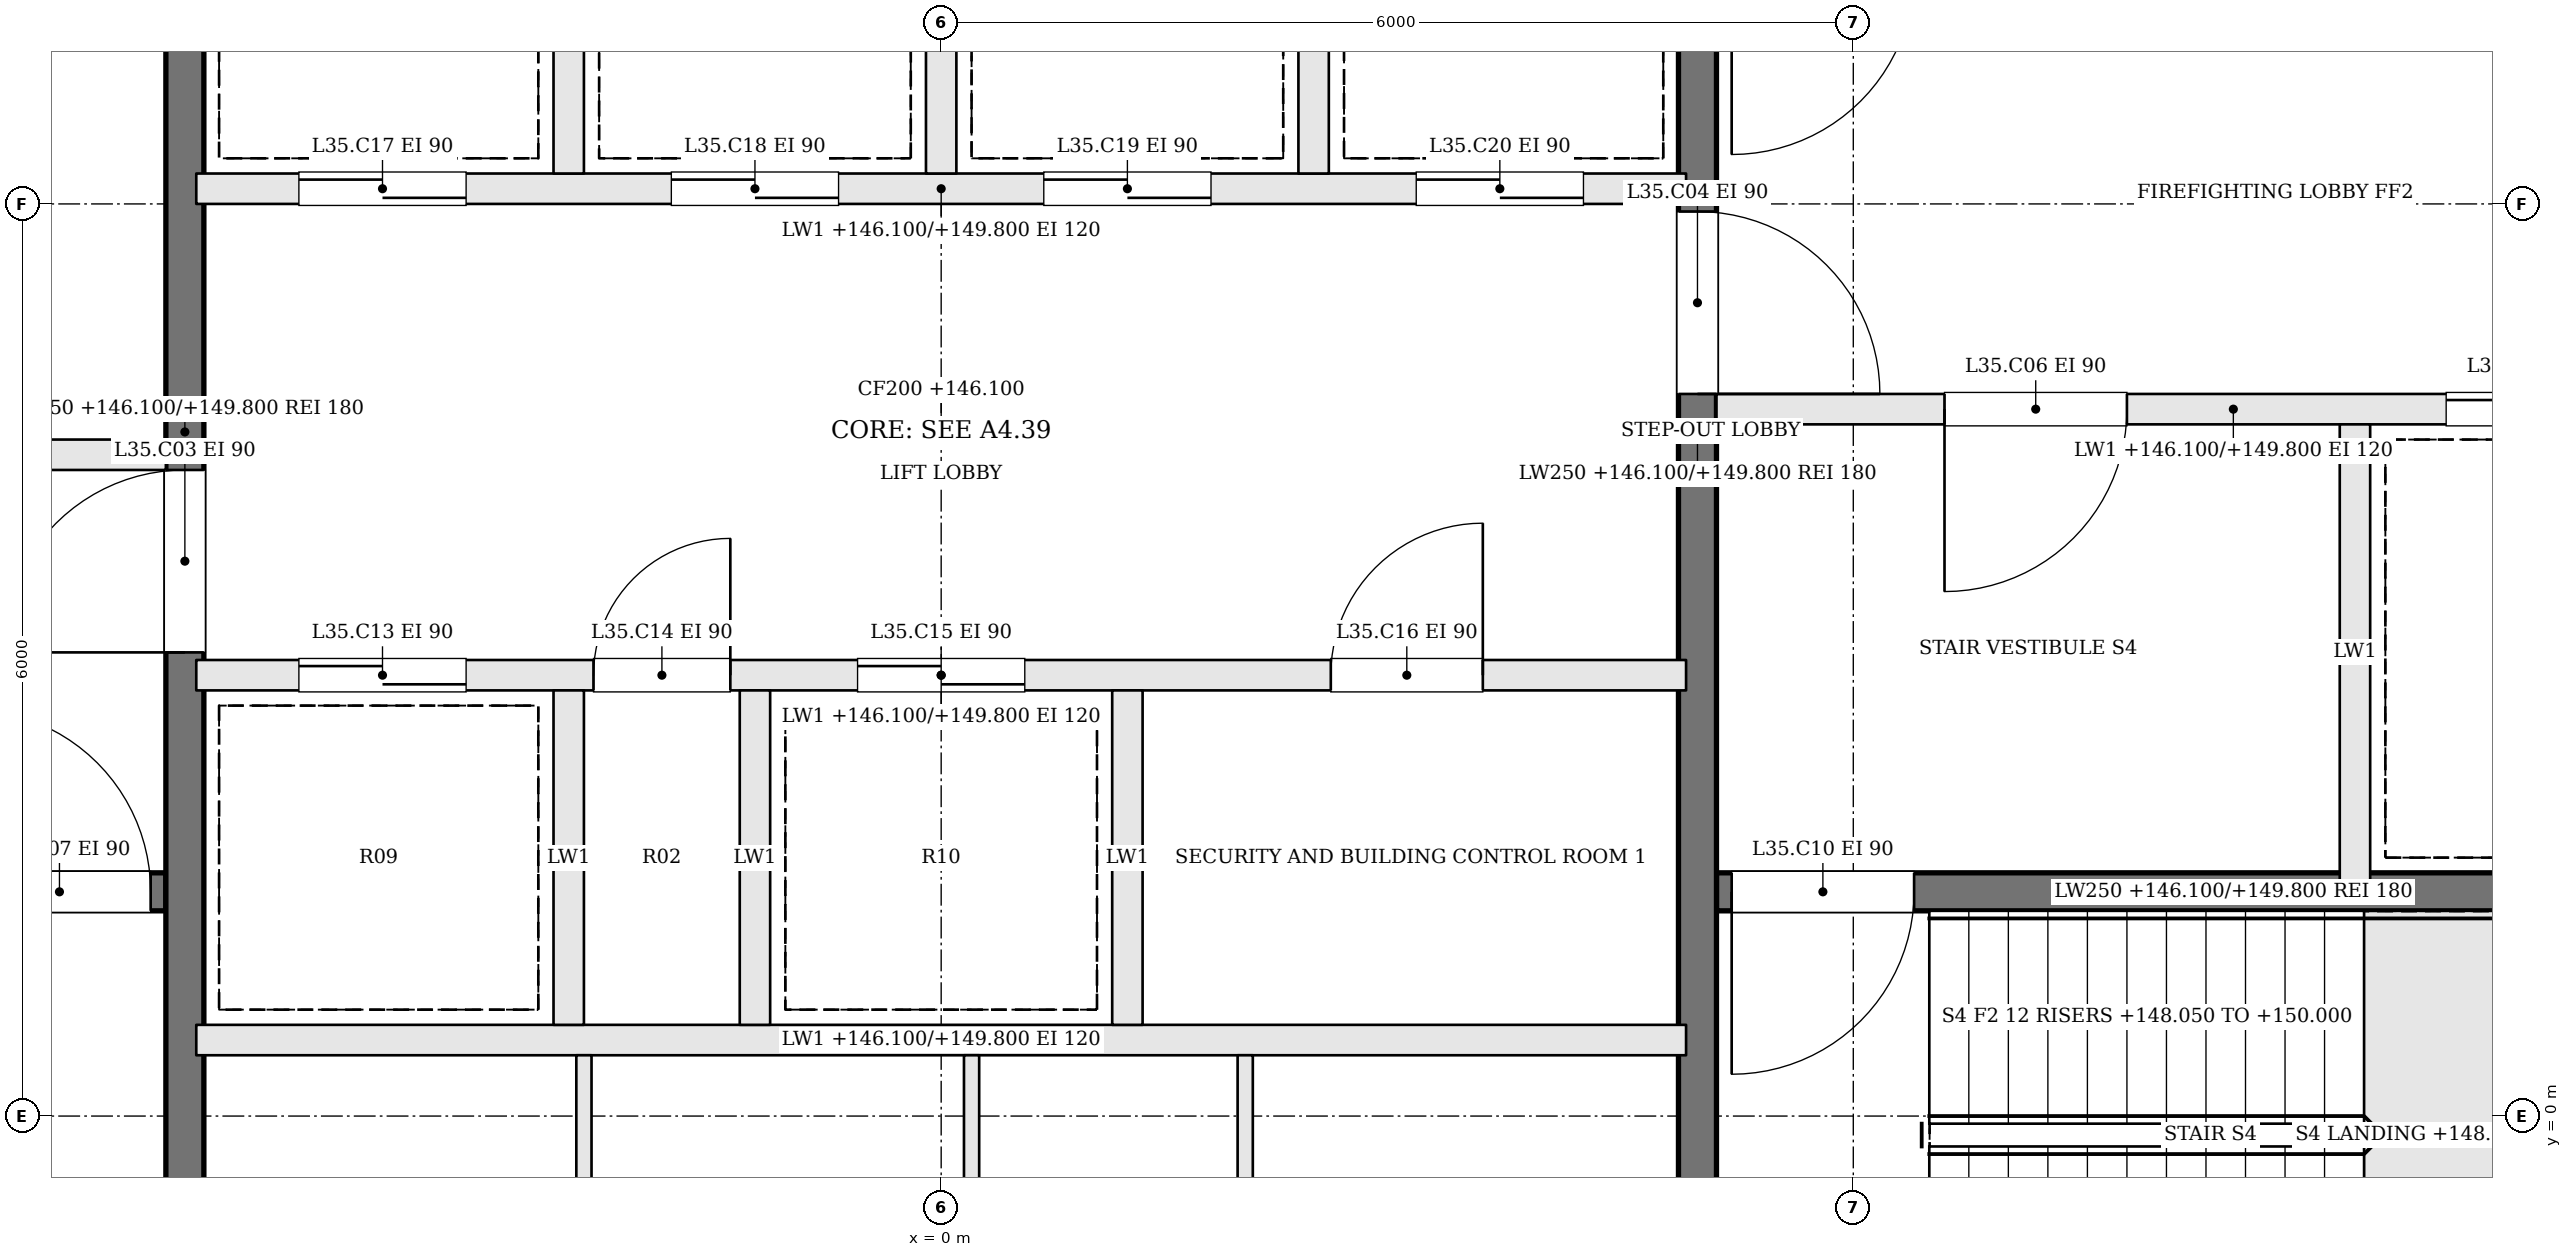
"""IFC4 building model, lengths in metres.
Left out: names, types, materials, properties, quantities, classifications, styles, units other than length and angle.
Written with IfcOpenShell. Run it as: python <this file> out.ifc"""

import sys

from ifc_helpers import new_model, si_unit, direction, frame, frame_2d, origin, place, context, subcontext, project, spatial, rectangle, extrude, element, fill, save


model = new_model("IFC4")
c1 = context("Model", 3, precision=1e-05, world=origin(), true_north=direction((0.0, 1.0)))
c2 = subcontext(c1, "Body", "Model", "MODEL_VIEW")
j1 = project(units=[si_unit("LENGTHUNIT", "METRE"), si_unit("PLANEANGLEUNIT", "RADIAN")], contexts=[c1])
p1 = place(None, origin())
s1 = spatial("IfcSite", under=j1, at=p1, CompositionType="ELEMENT")
p2 = place(p1, origin())
s2 = spatial("IfcBuilding", under=s1, at=p2, CompositionType="ELEMENT")
p3 = place(p2, frame((0.0, 0.0, 146.1)))
s3 = spatial("IfcBuildingStorey", under=s2, at=p3, CompositionType="ELEMENT", Elevation=146.1)
p4 = place(p3, frame((-11.9, 1.475, 0.0), z_axis=(0.0, 0.0, 1.0), x_axis=(1.0, 0.0, 0.0)))
e1 = element("IfcWall", 1, at=p4, inside=s3, PredefinedType="SOLIDWALL", context=c2, shape_type="SweptSolid", body=[
    extrude(rectangle(XDim=6.8, YDim=0.25, at=frame_2d((3.4, 0.0))), origin(), (0.0, 0.0, 1.0), 3.7),
])
p5 = place(p4, frame((5.5, 0.0, 0.0)))
e2 = element("IfcOpeningElement", 2, at=p5, cuts=e1, PredefinedType="OPENING", context=c2, shape_type="SweptSolid", body=[
    extrude(rectangle(XDim=1.2, YDim=2.1, at=frame_2d((0.6, 1.05))), frame((0.0, 0.135, 0.0), z_axis=(0.0, -1.0, 0.0), x_axis=(1.0, 0.0, 0.0)), (0.0, 0.0, 1.0), 0.27),
])
p6 = place(p3, frame((-11.9, 4.35, 0.0), z_axis=(0.0, 0.0, 1.0), x_axis=(1.0, 0.0, 0.0)))
e3 = element("IfcWall", 3, at=p6, inside=s3, PredefinedType="SOLIDWALL", context=c2, shape_type="SweptSolid", body=[
    extrude(rectangle(XDim=6.8, YDim=0.2, at=frame_2d((3.4, 0.0))), origin(), (0.0, 0.0, 1.0), 3.7),
])
p7 = place(p6, frame((4.1, 0.0, 0.0)))
e4 = element("IfcOpeningElement", 4, at=p7, cuts=e3, PredefinedType="OPENING", context=c2, shape_type="SweptSolid", body=[
    extrude(rectangle(XDim=1.2, YDim=2.1, at=frame_2d((0.6, 1.05))), frame((0.0, 0.11, 0.0), z_axis=(0.0, -1.0, 0.0), x_axis=(1.0, 0.0, 0.0)), (0.0, 0.0, 1.0), 0.22),
])
p8 = place(p6, frame((0.8, 0.0, 0.0)))
e5 = element("IfcOpeningElement", 5, at=p8, cuts=e3, PredefinedType="OPENING", context=c2, shape_type="SweptSolid", body=[
    extrude(rectangle(XDim=1.2, YDim=2.1, at=frame_2d((0.6, 1.05))), frame((0.0, 0.11, 0.0), z_axis=(0.0, -1.0, 0.0), x_axis=(1.0, 0.0, 0.0)), (0.0, 0.0, 1.0), 0.22),
])
p9 = place(p3, frame((11.9, 4.65, 0.0), z_axis=(0.0, 0.0, 1.0), x_axis=(-1.0, 0.0, 0.0)))
e6 = element("IfcWall", 6, at=p9, inside=s3, PredefinedType="SOLIDWALL", context=c2, shape_type="SweptSolid", body=[
    extrude(rectangle(XDim=6.8, YDim=0.2, at=frame_2d((3.4, 0.0))), origin(), (0.0, 0.0, 1.0), 3.7),
])
p10 = place(p9, frame((4.1, 0.0, 0.0)))
e7 = element("IfcOpeningElement", 7, at=p10, cuts=e6, PredefinedType="OPENING", context=c2, shape_type="SweptSolid", body=[
    extrude(rectangle(XDim=1.2, YDim=2.1, at=frame_2d((0.6, 1.05))), frame((0.0, 0.11, 0.0), z_axis=(0.0, -1.0, 0.0), x_axis=(1.0, 0.0, 0.0)), (0.0, 0.0, 1.0), 0.22),
])
p11 = place(p9, frame((0.8, 0.0, 0.0)))
e8 = element("IfcOpeningElement", 8, at=p11, cuts=e6, PredefinedType="OPENING", context=c2, shape_type="SweptSolid", body=[
    extrude(rectangle(XDim=1.2, YDim=2.1, at=frame_2d((0.6, 1.05))), frame((0.0, 0.11, 0.0), z_axis=(0.0, -1.0, 0.0), x_axis=(1.0, 0.0, 0.0)), (0.0, 0.0, 1.0), 0.22),
])
p12 = place(p3, frame((11.9, 1.475, 0.0), z_axis=(0.0, 0.0, 1.0), x_axis=(-1.0, 0.0, 0.0)))
e9 = element("IfcWall", 9, at=p12, inside=s3, PredefinedType="SOLIDWALL", context=c2, shape_type="SweptSolid", body=[
    extrude(rectangle(XDim=6.8, YDim=0.25, at=frame_2d((3.4, 0.0))), origin(), (0.0, 0.0, 1.0), 3.7),
])
p13 = place(p12, frame((5.5, 0.0, 0.0)))
e10 = element("IfcOpeningElement", 10, at=p13, cuts=e9, PredefinedType="OPENING", context=c2, shape_type="SweptSolid", body=[
    extrude(rectangle(XDim=1.2, YDim=2.1, at=frame_2d((0.6, 1.05))), frame((0.0, 0.135, 0.0), z_axis=(0.0, -1.0, 0.0), x_axis=(1.0, 0.0, 0.0)), (0.0, 0.0, 1.0), 0.27),
])
p14 = place(p3, frame((9.3, 4.55, 0.0), z_axis=(0.0, 0.0, 1.0), x_axis=(0.0, -1.0, 0.0)))
e11 = element("IfcWall", 11, at=p14, inside=s3, PredefinedType="SOLIDWALL", context=c2, shape_type="SweptSolid", body=[
    extrude(rectangle(XDim=3.0, YDim=0.2, at=frame_2d((1.5, 0.0))), origin(), (0.0, 0.0, 1.0), 3.7),
])
p15 = place(p3, frame((-4.975, -1.9, 0.0), z_axis=(0.0, 0.0, 1.0), x_axis=(0.0, 1.0, 0.0)))
e12 = element("IfcWall", 12, at=p15, inside=s3, PredefinedType="SOLIDWALL", context=c2, shape_type="SweptSolid", body=[
    extrude(rectangle(XDim=12.8, YDim=0.25, at=frame_2d((6.4, 0.0))), origin(), (0.0, 0.0, 1.0), 3.7),
])
p16 = place(p15, frame((4.95, 0.0, 0.0)))
e13 = element("IfcOpeningElement", 13, at=p16, cuts=e12, PredefinedType="OPENING", context=c2, shape_type="SweptSolid", body=[
    extrude(rectangle(XDim=1.2, YDim=2.1, at=frame_2d((0.6, 1.05))), frame((0.0, 0.135, 0.0), z_axis=(0.0, -1.0, 0.0), x_axis=(1.0, 0.0, 0.0)), (0.0, 0.0, 1.0), 0.27),
])
p17 = place(p3, frame((4.975, 10.9, 0.0), z_axis=(0.0, 0.0, 1.0), x_axis=(0.0, -1.0, 0.0)))
e14 = element("IfcWall", 14, at=p17, inside=s3, PredefinedType="SOLIDWALL", context=c2, shape_type="SweptSolid", body=[
    extrude(rectangle(XDim=12.8, YDim=0.25, at=frame_2d((6.4, 0.0))), origin(), (0.0, 0.0, 1.0), 3.7),
])
p18 = place(p17, frame((4.95, 0.0, 0.0)))
e15 = element("IfcOpeningElement", 15, at=p18, cuts=e14, PredefinedType="OPENING", context=c2, shape_type="SweptSolid", body=[
    extrude(rectangle(XDim=1.2, YDim=2.1, at=frame_2d((0.6, 1.05))), frame((0.0, 0.135, 0.0), z_axis=(0.0, -1.0, 0.0), x_axis=(1.0, 0.0, 0.0)), (0.0, 0.0, 1.0), 0.27),
])
p19 = place(p3, frame((-4.9, 0.5, 0.0), z_axis=(0.0, 0.0, 1.0), x_axis=(1.0, 0.0, 0.0)))
e16 = element("IfcWall", 16, at=p19, inside=s3, PredefinedType="SOLIDWALL", context=c2, shape_type="SweptSolid", body=[
    extrude(rectangle(XDim=9.8, YDim=0.2, at=frame_2d((4.9, 0.0))), origin(), (0.0, 0.0, 1.0), 3.7),
])
p20 = place(p3, frame((-4.9, 2.9, 0.0), z_axis=(0.0, 0.0, 1.0), x_axis=(1.0, 0.0, 0.0)))
e17 = element("IfcWall", 17, at=p20, inside=s3, PredefinedType="SOLIDWALL", context=c2, shape_type="SweptSolid", body=[
    extrude(rectangle(XDim=9.8, YDim=0.2, at=frame_2d((4.9, 0.0))), origin(), (0.0, 0.0, 1.0), 3.7),
])
p21 = place(p20, frame((0.675, 0.0, 0.0)))
e18 = element("IfcOpeningElement", 18, at=p21, cuts=e17, PredefinedType="OPENING", context=c2, shape_type="SweptSolid", body=[
    extrude(rectangle(XDim=1.1, YDim=2.1, at=frame_2d((0.55, 1.05))), frame((0.0, 0.11, 0.0), z_axis=(0.0, -1.0, 0.0), x_axis=(1.0, 0.0, 0.0)), (0.0, 0.0, 1.0), 0.22),
])
p22 = place(p20, frame((2.613, 0.0, 0.0)))
e19 = element("IfcOpeningElement", 19, at=p22, cuts=e17, PredefinedType="OPENING", context=c2, shape_type="SweptSolid", body=[
    extrude(rectangle(XDim=0.9, YDim=2.1, at=frame_2d((0.45, 1.05))), frame((0.0, 0.11, 0.0), z_axis=(0.0, -1.0, 0.0), x_axis=(1.0, 0.0, 0.0)), (0.0, 0.0, 1.0), 0.22),
])
p23 = place(p20, frame((4.35, 0.0, 0.0)))
e20 = element("IfcOpeningElement", 20, at=p23, cuts=e17, PredefinedType="OPENING", context=c2, shape_type="SweptSolid", body=[
    extrude(rectangle(XDim=1.1, YDim=2.1, at=frame_2d((0.55, 1.05))), frame((0.0, 0.11, 0.0), z_axis=(0.0, -1.0, 0.0), x_axis=(1.0, 0.0, 0.0)), (0.0, 0.0, 1.0), 0.22),
])
p24 = place(p20, frame((7.463, 0.0, 0.0)))
e21 = element("IfcOpeningElement", 21, at=p24, cuts=e17, PredefinedType="OPENING", context=c2, shape_type="SweptSolid", body=[
    extrude(rectangle(XDim=1.0, YDim=2.1, at=frame_2d((0.5, 1.05))), frame((0.0, 0.11, 0.0), z_axis=(0.0, -1.0, 0.0), x_axis=(1.0, 0.0, 0.0)), (0.0, 0.0, 1.0), 0.22),
])
p25 = place(p3, frame((-4.9, 6.1, 0.0), z_axis=(0.0, 0.0, 1.0), x_axis=(1.0, 0.0, 0.0)))
e22 = element("IfcWall", 22, at=p25, inside=s3, PredefinedType="SOLIDWALL", context=c2, shape_type="SweptSolid", body=[
    extrude(rectangle(XDim=9.8, YDim=0.2, at=frame_2d((4.9, 0.0))), origin(), (0.0, 0.0, 1.0), 3.7),
])
p26 = place(p25, frame((0.675, 0.0, 0.0)))
e23 = element("IfcOpeningElement", 23, at=p26, cuts=e22, PredefinedType="OPENING", context=c2, shape_type="SweptSolid", body=[
    extrude(rectangle(XDim=1.1, YDim=2.1, at=frame_2d((0.55, 1.05))), frame((0.0, 0.11, 0.0), z_axis=(0.0, -1.0, 0.0), x_axis=(1.0, 0.0, 0.0)), (0.0, 0.0, 1.0), 0.22),
])
p27 = place(p25, frame((3.125, 0.0, 0.0)))
e24 = element("IfcOpeningElement", 24, at=p27, cuts=e22, PredefinedType="OPENING", context=c2, shape_type="SweptSolid", body=[
    extrude(rectangle(XDim=1.1, YDim=2.1, at=frame_2d((0.55, 1.05))), frame((0.0, 0.11, 0.0), z_axis=(0.0, -1.0, 0.0), x_axis=(1.0, 0.0, 0.0)), (0.0, 0.0, 1.0), 0.22),
])
p28 = place(p25, frame((5.575, 0.0, 0.0)))
e25 = element("IfcOpeningElement", 25, at=p28, cuts=e22, PredefinedType="OPENING", context=c2, shape_type="SweptSolid", body=[
    extrude(rectangle(XDim=1.1, YDim=2.1, at=frame_2d((0.55, 1.05))), frame((0.0, 0.11, 0.0), z_axis=(0.0, -1.0, 0.0), x_axis=(1.0, 0.0, 0.0)), (0.0, 0.0, 1.0), 0.22),
])
p29 = place(p25, frame((8.025, 0.0, 0.0)))
e26 = element("IfcOpeningElement", 26, at=p29, cuts=e22, PredefinedType="OPENING", context=c2, shape_type="SweptSolid", body=[
    extrude(rectangle(XDim=1.1, YDim=2.1, at=frame_2d((0.55, 1.05))), frame((0.0, 0.11, 0.0), z_axis=(0.0, -1.0, 0.0), x_axis=(1.0, 0.0, 0.0)), (0.0, 0.0, 1.0), 0.22),
])
for number, where, z_axis, x_axis in (
    (27, (-2.45, 0.6, 0.0), (0.0, 0.0, 1.0), (0.0, 1.0, 0.0)),
    (28, (-1.225, 0.6, 0.0), (0.0, 0.0, 1.0), (0.0, 1.0, 0.0)),
    (29, (1.225, 0.6, 0.0), (0.0, 0.0, 1.0), (0.0, 1.0, 0.0)),
    (30, (-2.45, 6.2, 0.0), (0.0, 0.0, 1.0), (0.0, 1.0, 0.0)),
    (31, (0.0, 6.2, 0.0), (0.0, 0.0, 1.0), (0.0, 1.0, 0.0)),
    (32, (2.45, 6.2, 0.0), (0.0, 0.0, 1.0), (0.0, 1.0, 0.0)),
):
    element("IfcWall", number, at=place(p3, frame(where, z_axis=z_axis, x_axis=x_axis)), inside=s3, PredefinedType="SOLIDWALL", context=c2, shape_type="SweptSolid", body=[
        extrude(rectangle(XDim=2.2, YDim=0.2, at=frame_2d((1.1, 0.0))), origin(), (0.0, 0.0, 1.0), 3.7),
    ])
for number, where, z_axis, x_axis in (
    (33, (-2.35, -1.9, 0.0), (0.0, 0.0, 1.0), (0.0, 1.0, 0.0)),
    (34, (0.2, -1.9, 0.0), (0.0, 0.0, 1.0), (0.0, 1.0, 0.0)),
    (35, (2.0, -1.9, 0.0), (0.0, 0.0, 1.0), (0.0, 1.0, 0.0)),
):
    element("IfcWall", number, at=place(p3, frame(where, z_axis=z_axis, x_axis=x_axis)), inside=s3, PredefinedType="PARTITIONING", context=c2, shape_type="SweptSolid", body=[
        extrude(rectangle(XDim=2.3, YDim=0.1, at=frame_2d((1.15, 0.0))), origin(), (0.0, 0.0, 1.0), 3.7),
    ])
p30 = place(p16, origin())
e36 = element("IfcDoor", 36, at=p30, inside=s3, OperationType="SINGLE_SWING_LEFT", PredefinedType="DOOR", context=c2, shape_type="SweptSolid", body=[
    extrude(rectangle(XDim=1.2, YDim=2.1, at=frame_2d((0.6, 1.05))), frame((0.0, 0.025, 0.0), z_axis=(0.0, -1.0, 0.0), x_axis=(1.0, 0.0, 0.0)), (0.0, 0.0, 1.0), 0.05),
])
fill(e13, e36)
p31 = place(p18, origin())
e37 = element("IfcDoor", 37, at=p31, inside=s3, OperationType="SINGLE_SWING_RIGHT", PredefinedType="DOOR", context=c2, shape_type="SweptSolid", body=[
    extrude(rectangle(XDim=1.2, YDim=2.1, at=frame_2d((0.6, 1.05))), frame((0.0, 0.025, 0.0), z_axis=(0.0, -1.0, 0.0), x_axis=(1.0, 0.0, 0.0)), (0.0, 0.0, 1.0), 0.05),
])
fill(e15, e37)
p32 = place(p10, origin())
e38 = element("IfcDoor", 38, at=p32, inside=s3, OperationType="SINGLE_SWING_RIGHT", PredefinedType="DOOR", context=c2, shape_type="SweptSolid", body=[
    extrude(rectangle(XDim=1.2, YDim=2.1, at=frame_2d((0.6, 1.05))), frame((0.0, 0.025, 0.0), z_axis=(0.0, -1.0, 0.0), x_axis=(1.0, 0.0, 0.0)), (0.0, 0.0, 1.0), 0.05),
])
fill(e7, e38)
p33 = place(p5, origin())
e39 = element("IfcDoor", 39, at=p33, inside=s3, OperationType="SINGLE_SWING_LEFT", PredefinedType="DOOR", context=c2, shape_type="SweptSolid", body=[
    extrude(rectangle(XDim=1.2, YDim=2.1, at=frame_2d((0.6, 1.05))), frame((0.0, 0.025, 0.0), z_axis=(0.0, -1.0, 0.0), x_axis=(1.0, 0.0, 0.0)), (0.0, 0.0, 1.0), 0.05),
])
fill(e2, e39)
p34 = place(p13, origin())
e40 = element("IfcDoor", 40, at=p34, inside=s3, OperationType="SINGLE_SWING_RIGHT", PredefinedType="DOOR", context=c2, shape_type="SweptSolid", body=[
    extrude(rectangle(XDim=1.2, YDim=2.1, at=frame_2d((0.6, 1.05))), frame((0.0, 0.025, 0.0), z_axis=(0.0, -1.0, 0.0), x_axis=(1.0, 0.0, 0.0)), (0.0, 0.0, 1.0), 0.05),
])
fill(e10, e40)
p35 = place(p11, origin())
e41 = element("IfcDoor", 41, at=p35, inside=s3, OperationType="SLIDING_TO_RIGHT", PredefinedType="DOOR", context=c2, shape_type="SweptSolid", body=[
    extrude(rectangle(XDim=1.2, YDim=2.1, at=frame_2d((0.6, 1.05))), frame((0.0, 0.025, 0.0), z_axis=(0.0, -1.0, 0.0), x_axis=(1.0, 0.0, 0.0)), (0.0, 0.0, 1.0), 0.05),
])
fill(e8, e41)
p36 = place(p21, origin())
e42 = element("IfcDoor", 42, at=p36, inside=s3, OperationType="SLIDING_TO_RIGHT", PredefinedType="DOOR", context=c2, shape_type="SweptSolid", body=[
    extrude(rectangle(XDim=1.1, YDim=2.1, at=frame_2d((0.55, 1.05))), frame((0.0, 0.025, 0.0), z_axis=(0.0, -1.0, 0.0), x_axis=(1.0, 0.0, 0.0)), (0.0, 0.0, 1.0), 0.05),
])
fill(e18, e42)
p37 = place(p22, origin())
e43 = element("IfcDoor", 43, at=p37, inside=s3, OperationType="SINGLE_SWING_RIGHT", PredefinedType="DOOR", context=c2, shape_type="SweptSolid", body=[
    extrude(rectangle(XDim=0.9, YDim=2.1, at=frame_2d((0.45, 1.05))), frame((0.0, 0.025, 0.0), z_axis=(0.0, -1.0, 0.0), x_axis=(1.0, 0.0, 0.0)), (0.0, 0.0, 1.0), 0.05),
])
fill(e19, e43)
p38 = place(p23, origin())
e44 = element("IfcDoor", 44, at=p38, inside=s3, OperationType="SLIDING_TO_LEFT", PredefinedType="DOOR", context=c2, shape_type="SweptSolid", body=[
    extrude(rectangle(XDim=1.1, YDim=2.1, at=frame_2d((0.55, 1.05))), frame((0.0, 0.025, 0.0), z_axis=(0.0, -1.0, 0.0), x_axis=(1.0, 0.0, 0.0)), (0.0, 0.0, 1.0), 0.05),
])
fill(e20, e44)
p39 = place(p24, origin())
e45 = element("IfcDoor", 45, at=p39, inside=s3, OperationType="SINGLE_SWING_RIGHT", PredefinedType="DOOR", context=c2, shape_type="SweptSolid", body=[
    extrude(rectangle(XDim=1.0, YDim=2.1, at=frame_2d((0.5, 1.05))), frame((0.0, 0.025, 0.0), z_axis=(0.0, -1.0, 0.0), x_axis=(1.0, 0.0, 0.0)), (0.0, 0.0, 1.0), 0.05),
])
fill(e21, e45)
p40 = place(p26, origin())
e46 = element("IfcDoor", 46, at=p40, inside=s3, OperationType="SLIDING_TO_RIGHT", PredefinedType="DOOR", context=c2, shape_type="SweptSolid", body=[
    extrude(rectangle(XDim=1.1, YDim=2.1, at=frame_2d((0.55, 1.05))), frame((0.0, 0.025, 0.0), z_axis=(0.0, -1.0, 0.0), x_axis=(1.0, 0.0, 0.0)), (0.0, 0.0, 1.0), 0.05),
])
fill(e23, e46)
p41 = place(p27, origin())
e47 = element("IfcDoor", 47, at=p41, inside=s3, OperationType="SLIDING_TO_LEFT", PredefinedType="DOOR", context=c2, shape_type="SweptSolid", body=[
    extrude(rectangle(XDim=1.1, YDim=2.1, at=frame_2d((0.55, 1.05))), frame((0.0, 0.025, 0.0), z_axis=(0.0, -1.0, 0.0), x_axis=(1.0, 0.0, 0.0)), (0.0, 0.0, 1.0), 0.05),
])
fill(e24, e47)
p42 = place(p28, origin())
e48 = element("IfcDoor", 48, at=p42, inside=s3, OperationType="SLIDING_TO_RIGHT", PredefinedType="DOOR", context=c2, shape_type="SweptSolid", body=[
    extrude(rectangle(XDim=1.1, YDim=2.1, at=frame_2d((0.55, 1.05))), frame((0.0, 0.025, 0.0), z_axis=(0.0, -1.0, 0.0), x_axis=(1.0, 0.0, 0.0)), (0.0, 0.0, 1.0), 0.05),
])
fill(e25, e48)
p43 = place(p29, origin())
e49 = element("IfcDoor", 49, at=p43, inside=s3, OperationType="SLIDING_TO_LEFT", PredefinedType="DOOR", context=c2, shape_type="SweptSolid", body=[
    extrude(rectangle(XDim=1.1, YDim=2.1, at=frame_2d((0.55, 1.05))), frame((0.0, 0.025, 0.0), z_axis=(0.0, -1.0, 0.0), x_axis=(1.0, 0.0, 0.0)), (0.0, 0.0, 1.0), 0.05),
])
fill(e26, e49)
save(model, sys.argv[1])
